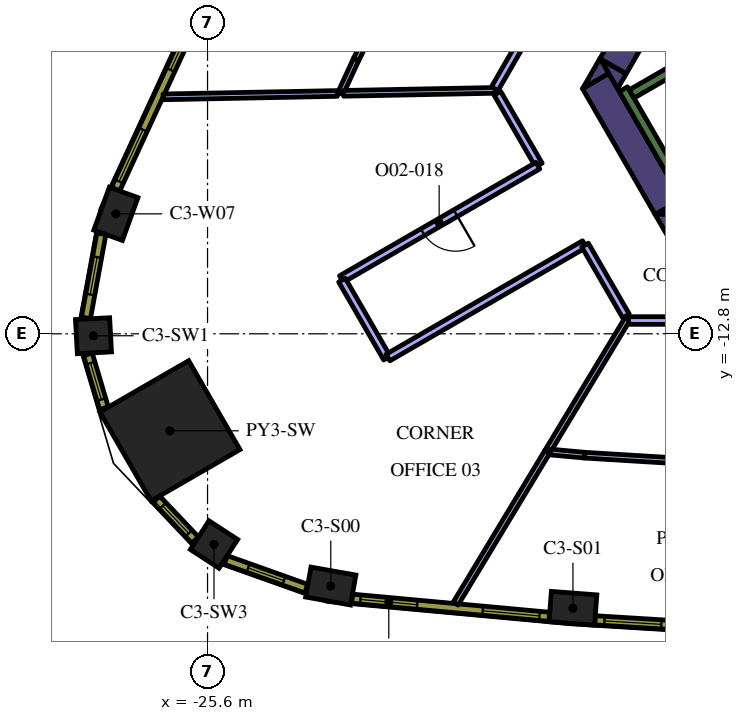
"""IFC4 building model, lengths in metres.
Left out: names, types, materials, properties, quantities, classifications, styles, units other than length and angle.
Written with IfcOpenShell. Run it as: python <this file> out.ifc"""

import sys

from ifc_helpers import new_model, si_unit, direction, frame, frame_2d, origin, origin_2d, place, context, subcontext, project, spatial, polyline, rectangle, outline, extrude, element, fill, save


model = new_model("IFC4")
c1 = context("Model", 3, precision=1e-05, world=origin(), true_north=direction((0.0, 1.0)))
c2 = subcontext(c1, "Body", "Model", "MODEL_VIEW")
j1 = project(units=[si_unit("LENGTHUNIT", "METRE"), si_unit("PLANEANGLEUNIT", "RADIAN")], contexts=[c1])
p1 = place(None, origin())
s1 = spatial("IfcSite", under=j1, at=p1, CompositionType="ELEMENT")
p2 = place(p1, origin())
s2 = spatial("IfcBuilding", under=s1, at=p2, CompositionType="ELEMENT")
p3 = place(p2, frame((0.0, 0.0, 158.4)))
s3 = spatial("IfcBuildingStorey", under=s2, at=p3, CompositionType="ELEMENT", Elevation=158.4)
p4 = place(p3, frame((-26.591, -15.352, 0.0), z_axis=(0.0, 0.0, 1.0), x_axis=(-0.866025403784, -0.5, 0.0)))
e1 = element("IfcColumn", 1, at=p4, inside=s3, PredefinedType="COLUMN", context=c2, shape_type="SweptSolid", body=[
    extrude(rectangle(XDim=2.7, YDim=2.7, at=origin_2d()), origin(), (0.0, 0.0, 1.0), 4.2),
])
for number, where, z_axis, x_axis in (
    (2, (-22.357, -19.437, 0.0), (0.0, 0.0, 1.0), (0.985, -0.175, 0.0)),
    (3, (-15.985, -20.022, 0.0), (0.0, 0.0, 1.0), (0.997, -0.076, 0.0)),
    (4, (-28.012, -9.644, 0.0), (0.0, 0.0, 1.0), (-0.341, -0.94, 0.0)),
):
    element("IfcColumn", number, at=place(p3, frame(where, z_axis=z_axis, x_axis=x_axis)), inside=s3, PredefinedType="COLUMN", context=c2, shape_type="SweptSolid", body=[
        extrude(rectangle(XDim=1.2, YDim=0.8, at=origin_2d()), origin(), (0.0, 0.0, 1.0), 4.2),
    ])
for number, where, z_axis, x_axis in (
    (5, (-28.601, -12.851, 0.0), (0.0, 0.0, 1.0), (0.053, -0.999, 0.0)),
    (6, (-25.43, -18.344, 0.0), (0.0, 0.0, 1.0), (0.838, -0.546, 0.0)),
):
    element("IfcColumn", number, at=place(p3, frame(where, z_axis=z_axis, x_axis=x_axis)), inside=s3, PredefinedType="COLUMN", context=c2, shape_type="SweptSolid", body=[
        extrude(rectangle(XDim=0.9, YDim=0.9, at=origin_2d()), origin(), (0.0, 0.0, 1.0), 4.2),
    ])
p5 = place(p3, origin())
e7 = element("IfcWall", 7, at=p5, inside=s3, PredefinedType="SOLIDWALL", context=c2, shape_type="SweptSolid", body=[
    extrude(outline(polyline([(-13.828, -9.65), (-13.38, -9.65), (-13.38, -10.426), (-13.828, -9.65)])), origin(), (0.0, 0.0, 1.0), 4.2),
])
p6 = place(p3, frame((-15.387, -6.148, 0.0), z_axis=(0.0, 0.0, 1.0), x_axis=(0.499984020225, -0.866034629516, 0.0)))
e8 = element("IfcWall", 8, at=p6, inside=s3, PredefinedType="SOLIDWALL", context=c2, shape_type="SweptSolid", body=[
    extrude(rectangle(XDim=3.824, YDim=0.8, at=frame_2d((1.912, 0.0))), origin(), (0.0, 0.0, 1.0), 4.2),
])
e9 = element("IfcWall", 9, at=p5, inside=s3, PredefinedType="SOLIDWALL", context=c2, shape_type="SweptSolid", body=[
    extrude(outline(polyline([(-15.042, -5.947), (-15.729, -6.343), (-15.271, -5.55), (-15.042, -5.947)])), origin(), (0.0, 0.0, 1.0), 4.2),
])
e10 = element("IfcWall", 10, at=p5, inside=s3, PredefinedType="SOLIDWALL", context=c2, shape_type="SweptSolid", body=[
    extrude(outline(polyline([(-12.904, -9.65), (-13.8, -9.65), (-13.128, -9.262), (-12.904, -9.65)])), origin(), (0.0, 0.0, 1.0), 4.2),
])
p7 = place(p3, frame((-13.518, -3.314, 0.0), z_axis=(0.0, 0.0, 1.0), x_axis=(-0.499969377405, -0.866043083026, 0.0)))
e11 = element("IfcWall", 11, at=p7, inside=s3, PredefinedType="SOLIDWALL", context=c2, shape_type="SweptSolid", body=[
    extrude(rectangle(XDim=2.824, YDim=0.8, at=frame_2d((1.412, 0.0))), origin(), (0.0, 0.0, 1.0), 4.2),
])
e12 = element("IfcWall", 12, at=p5, inside=s3, PredefinedType="SOLIDWALL", context=c2, shape_type="SweptSolid", body=[
    extrude(outline(polyline([(-14.809, -6.35), (-15.257, -5.574), (-14.585, -5.962), (-14.809, -6.35)])), origin(), (0.0, 0.0, 1.0), 4.2),
])
p8 = place(p3, frame((-12.84, -9.511, 0.0), z_axis=(0.0, 0.0, 1.0), x_axis=(-0.499997733992, 0.866026712061, 0.0)))
e13 = element("IfcWall", 13, at=p8, inside=s3, PredefinedType="SOLIDWALL", context=c2, shape_type="SweptSolid", body=[
    extrude(rectangle(XDim=3.634, YDim=0.25, at=frame_2d((1.817, 0.0))), origin(), (0.0, 0.0, 1.0), 4.2),
])
p9 = place(p3, frame((-14.44, -6.49, 0.0), z_axis=(0.0, 0.0, 1.0), x_axis=(0.866022966069, 0.500004222222, 0.0)))
e14 = element("IfcWall", 14, at=p9, inside=s3, PredefinedType="SOLIDWALL", context=c2, shape_type="SweptSolid", body=[
    extrude(rectangle(XDim=6.8, YDim=0.25, at=frame_2d((3.4, 0.0))), origin(), (0.0, 0.0, 1.0), 4.2),
])
p10 = place(p3, frame((-21.689, -5.579, 0.0), z_axis=(0.0, 0.0, 1.0), x_axis=(0.446219729364, 0.894923434225, 0.0)))
e15 = element("IfcWall", 15, at=p10, inside=s3, PredefinedType="PARTITIONING", context=c2, shape_type="SweptSolid", body=[
    extrude(rectangle(XDim=5.995, YDim=0.15, at=frame_2d((2.998, 0.0))), origin(), (0.0, 0.0, 1.0), 3.15),
])
p11 = place(p10, frame((2.595, 0.0, 0.0)))
e16 = element("IfcOpeningElement", 16, at=p11, cuts=e15, PredefinedType="OPENING", context=c2, shape_type="SweptSolid", body=[
    extrude(rectangle(XDim=0.9, YDim=2.1, at=frame_2d((0.45, 1.05))), frame((0.0, 0.085, 0.0), z_axis=(0.0, -1.0, 0.0), x_axis=(1.0, 0.0, 0.0)), (0.0, 0.0, 1.0), 0.17),
])
p12 = place(p3, frame((-21.689, -5.579, 0.0), z_axis=(0.0, 0.0, 1.0), x_axis=(-0.418649696334, -0.908147802816, 0.0)))
e17 = element("IfcWall", 17, at=p12, inside=s3, PredefinedType="PARTITIONING", context=c2, shape_type="SweptSolid", body=[
    extrude(rectangle(XDim=0.986, YDim=0.15, at=frame_2d((0.493, 0.0))), origin(), (0.0, 0.0, 1.0), 3.15),
])
p13 = place(p3, frame((-22.185, -6.476, 0.0), z_axis=(0.0, 0.0, 1.0), x_axis=(-0.999810025733, -0.019491342784, 0.0)))
e18 = element("IfcWall", 18, at=p13, inside=s3, PredefinedType="PARTITIONING", context=c2, shape_type="SweptSolid", body=[
    extrude(rectangle(XDim=4.584, YDim=0.15, at=frame_2d((2.292, 0.0))), origin(), (0.0, 0.0, 1.0), 3.15),
])
p14 = place(p3, frame((-18.016, -6.395, 0.0), z_axis=(0.0, 0.0, 1.0), x_axis=(-0.999809528944, -0.019516808959, 0.0)))
e19 = element("IfcWall", 19, at=p14, inside=s3, PredefinedType="PARTITIONING", context=c2, shape_type="SweptSolid", body=[
    extrude(rectangle(XDim=4.003, YDim=0.15, at=frame_2d((2.001, 0.0))), origin(), (0.0, 0.0, 1.0), 3.15),
])
p15 = place(p3, frame((-13.047, 2.302, 0.0), z_axis=(0.0, 0.0, 1.0), x_axis=(-0.499986873641, -0.866032982159, 0.0)))
e20 = element("IfcWall", 20, at=p15, inside=s3, PredefinedType="PARTITIONING", context=c2, shape_type="SweptSolid", body=[
    extrude(rectangle(XDim=9.99, YDim=0.2, at=frame_2d((4.995, 0.0))), origin(), (0.0, 0.0, 1.0), 3.15),
])
p16 = place(p15, frame((4.5, 0.0, 0.0)))
e21 = element("IfcOpeningElement", 21, at=p16, cuts=e20, PredefinedType="OPENING", context=c2, shape_type="SweptSolid", body=[
    extrude(rectangle(XDim=1.0, YDim=2.1, at=frame_2d((0.5, 1.05))), frame((0.0, 0.11, 0.0), z_axis=(0.0, -1.0, 0.0), x_axis=(1.0, 0.0, 0.0)), (0.0, 0.0, 1.0), 0.22),
])
p17 = place(p3, frame((-16.656, -15.9, 0.0), z_axis=(0.0, 0.0, 1.0), x_axis=(-0.516845255261, -0.856078841062, 0.0)))
e22 = element("IfcWall", 22, at=p17, inside=s3, PredefinedType="PARTITIONING", context=c2, shape_type="SweptSolid", body=[
    extrude(rectangle(XDim=4.672, YDim=0.15, at=frame_2d((2.336, 0.0))), origin(), (0.0, 0.0, 1.0), 3.15),
])
p18 = place(p3, frame((-14.546, -12.406, 0.0), z_axis=(0.0, 0.0, 1.0), x_axis=(-0.516811321583, -0.856099327113, 0.0)))
e23 = element("IfcWall", 23, at=p18, inside=s3, PredefinedType="PARTITIONING", context=c2, shape_type="SweptSolid", body=[
    extrude(rectangle(XDim=4.09, YDim=0.15, at=frame_2d((2.045, 0.0))), origin(), (0.0, 0.0, 1.0), 3.15),
])
p19 = place(p3, frame((-17.974, -6.469, 0.0), z_axis=(0.0, 0.0, 1.0), x_axis=(0.499961062019, -0.866047883471, 0.0)))
e24 = element("IfcWall", 24, at=p19, inside=s3, PredefinedType="PARTITIONING", context=c2, shape_type="SweptSolid", body=[
    extrude(rectangle(XDim=2.185, YDim=0.2, at=frame_2d((1.092, 0.0))), origin(), (0.0, 0.0, 1.0), 3.15),
])
p20 = place(p3, frame((-16.907, -8.376, 0.0), z_axis=(0.0, 0.0, 1.0), x_axis=(-0.866017375886, -0.50001390447, 0.0)))
e25 = element("IfcWall", 25, at=p20, inside=s3, PredefinedType="PARTITIONING", context=c2, shape_type="SweptSolid", body=[
    extrude(rectangle(XDim=5.97, YDim=0.2, at=frame_2d((2.985, 0.0))), origin(), (0.0, 0.0, 1.0), 3.15),
])
p21 = place(p20, frame((2.5, 0.0, 0.0)))
e26 = element("IfcOpeningElement", 26, at=p21, cuts=e25, PredefinedType="OPENING", context=c2, shape_type="SweptSolid", body=[
    extrude(rectangle(XDim=1.0, YDim=2.1, at=frame_2d((0.5, 1.05))), frame((0.0, 0.11, 0.0), z_axis=(0.0, -1.0, 0.0), x_axis=(1.0, 0.0, 0.0)), (0.0, 0.0, 1.0), 0.22),
])
p22 = place(p3, frame((-22.062, -11.387, 0.0), z_axis=(0.0, 0.0, 1.0), x_axis=(0.5000167099, -0.866015756104, 0.0)))
e27 = element("IfcWall", 27, at=p22, inside=s3, PredefinedType="PARTITIONING", context=c2, shape_type="SweptSolid", body=[
    extrude(rectangle(XDim=2.37, YDim=0.2, at=frame_2d((1.185, 0.0))), origin(), (0.0, 0.0, 1.0), 3.15),
])
p23 = place(p3, frame((-20.851, -13.424, 0.0), z_axis=(0.0, 0.0, 1.0), x_axis=(0.866007151214, 0.500031613047, 0.0)))
e28 = element("IfcWall", 28, at=p23, inside=s3, PredefinedType="PARTITIONING", context=c2, shape_type="SweptSolid", body=[
    extrude(rectangle(XDim=5.97, YDim=0.2, at=frame_2d((2.985, 0.0))), origin(), (0.0, 0.0, 1.0), 3.15),
])
p24 = place(p3, frame((-15.666, -10.465, 0.0), z_axis=(0.0, 0.0, 1.0), x_axis=(0.499977443261, -0.866038426532, 0.0)))
e29 = element("IfcWall", 29, at=p24, inside=s3, PredefinedType="PARTITIONING", context=c2, shape_type="SweptSolid", body=[
    extrude(rectangle(XDim=2.155, YDim=0.2, at=frame_2d((1.077, 0.0))), origin(), (0.0, 0.0, 1.0), 3.15),
])
p25 = place(p3, frame((-16.575, -15.911, 0.0), z_axis=(0.0, 0.0, 1.0), x_axis=(0.995808489615, -0.09146284497, 0.0)))
e30 = element("IfcWall", 30, at=p25, inside=s3, PredefinedType="PARTITIONING", context=c2, shape_type="SweptSolid", body=[
    extrude(rectangle(XDim=0.902, YDim=0.15, at=frame_2d((0.451, 0.0))), origin(), (0.0, 0.0, 1.0), 3.15),
])
p26 = place(p3, frame((-9.692, -16.36, 0.0), z_axis=(0.0, 0.0, 1.0), x_axis=(-0.998135339661, 0.061039689709, 0.0)))
e31 = element("IfcWall", 31, at=p26, inside=s3, PredefinedType="PARTITIONING", context=c2, shape_type="SweptSolid", body=[
    extrude(rectangle(XDim=5.996, YDim=0.15, at=frame_2d((2.998, 0.0))), origin(), (0.0, 0.0, 1.0), 3.15),
])
p27 = place(p26, frame((2.595, 0.0, 0.0)))
e32 = element("IfcOpeningElement", 32, at=p27, cuts=e31, PredefinedType="OPENING", context=c2, shape_type="SweptSolid", body=[
    extrude(rectangle(XDim=0.9, YDim=2.1, at=frame_2d((0.45, 1.05))), frame((0.0, 0.085, 0.0), z_axis=(0.0, -1.0, 0.0), x_axis=(1.0, 0.0, 0.0)), (0.0, 0.0, 1.0), 0.17),
])
p28 = place(p3, frame((-14.521, -12.45, 0.0), z_axis=(0.0, 0.0, 1.0), x_axis=(1.0, 0.0, 0.0)))
e33 = element("IfcWall", 33, at=p28, inside=s3, PredefinedType="PARTITIONING", context=c2, shape_type="SweptSolid", body=[
    extrude(rectangle(XDim=9.99, YDim=0.2, at=frame_2d((4.995, 0.0))), origin(), (0.0, 0.0, 1.0), 3.15),
])
p29 = place(p28, frame((4.5, 0.0, 0.0)))
e34 = element("IfcOpeningElement", 34, at=p29, cuts=e33, PredefinedType="OPENING", context=c2, shape_type="SweptSolid", body=[
    extrude(rectangle(XDim=1.0, YDim=2.1, at=frame_2d((0.5, 1.05))), frame((0.0, 0.11, 0.0), z_axis=(0.0, -1.0, 0.0), x_axis=(1.0, 0.0, 0.0)), (0.0, 0.0, 1.0), 0.22),
])
p30 = place(p3, frame((-21.797, -19.77, 0.0), z_axis=(0.0, 0.0, 1.0), x_axis=(0.995808712151, -0.091460422067, 0.0)))
e35 = element("IfcWall", 35, at=p30, inside=s3, PredefinedType="SOLIDWALL", context=c2, shape_type="SweptSolid", body=[
    extrude(rectangle(XDim=5.213, YDim=0.24, at=frame_2d((2.606, 0.0))), origin(), (0.0, 0.0, 1.0), 3.95),
])
p31 = place(p30, frame((0.221, 0.0, 0.9)))
e36 = element("IfcOpeningElement", 36, at=p31, cuts=e35, PredefinedType="OPENING", context=c2, shape_type="SweptSolid", body=[
    extrude(rectangle(XDim=1.5, YDim=2.55, at=frame_2d((0.75, 1.275))), frame((0.0, 0.13, 0.0), z_axis=(0.0, -1.0, 0.0), x_axis=(1.0, 0.0, 0.0)), (0.0, 0.0, 1.0), 0.26),
])
p32 = place(p30, frame((3.452, 0.0, 0.9)))
e37 = element("IfcOpeningElement", 37, at=p32, cuts=e35, PredefinedType="OPENING", context=c2, shape_type="SweptSolid", body=[
    extrude(rectangle(XDim=1.5, YDim=2.55, at=frame_2d((0.75, 1.275))), frame((0.0, 0.13, 0.0), z_axis=(0.0, -1.0, 0.0), x_axis=(1.0, 0.0, 0.0)), (0.0, 0.0, 1.0), 0.26),
])
p33 = place(p3, frame((-15.405, -20.338, 0.0), z_axis=(0.0, 0.0, 1.0), x_axis=(0.998135294646, -0.061040425794, 0.0)))
e38 = element("IfcWall", 38, at=p33, inside=s3, PredefinedType="SOLIDWALL", context=c2, shape_type="SweptSolid", body=[
    extrude(rectangle(XDim=5.204, YDim=0.24, at=frame_2d((2.602, 0.0))), origin(), (0.0, 0.0, 1.0), 3.95),
])
p34 = place(p33, frame((0.248, 0.0, 0.9)))
e39 = element("IfcOpeningElement", 39, at=p34, cuts=e38, PredefinedType="OPENING", context=c2, shape_type="SweptSolid", body=[
    extrude(rectangle(XDim=1.5, YDim=2.55, at=frame_2d((0.75, 1.275))), frame((0.0, 0.13, 0.0), z_axis=(0.0, -1.0, 0.0), x_axis=(1.0, 0.0, 0.0)), (0.0, 0.0, 1.0), 0.26),
])
p35 = place(p33, frame((3.455, 0.0, 0.9)))
e40 = element("IfcOpeningElement", 40, at=p35, cuts=e38, PredefinedType="OPENING", context=c2, shape_type="SweptSolid", body=[
    extrude(rectangle(XDim=1.5, YDim=2.55, at=frame_2d((0.75, 1.275))), frame((0.0, 0.13, 0.0), z_axis=(0.0, -1.0, 0.0), x_axis=(1.0, 0.0, 0.0)), (0.0, 0.0, 1.0), 0.26),
])
p36 = place(p3, frame((-25.837, -4.258, 0.0), z_axis=(0.0, 0.0, 1.0), x_axis=(-0.418722559465, -0.908114209885, 0.0)))
e41 = element("IfcWall", 41, at=p36, inside=s3, PredefinedType="SOLIDWALL", context=c2, shape_type="SweptSolid", body=[
    extrude(rectangle(XDim=5.213, YDim=0.24, at=frame_2d((2.606, 0.0))), origin(), (0.0, 0.0, 1.0), 3.95),
])
p37 = place(p36, frame((0.261, 0.0, 0.9)))
e42 = element("IfcOpeningElement", 42, at=p37, cuts=e41, PredefinedType="OPENING", context=c2, shape_type="SweptSolid", body=[
    extrude(rectangle(XDim=1.5, YDim=2.55, at=frame_2d((0.75, 1.275))), frame((0.0, 0.13, 0.0), z_axis=(0.0, -1.0, 0.0), x_axis=(1.0, 0.0, 0.0)), (0.0, 0.0, 1.0), 0.26),
])
p38 = place(p36, frame((3.492, 0.0, 0.9)))
e43 = element("IfcOpeningElement", 43, at=p38, cuts=e41, PredefinedType="OPENING", context=c2, shape_type="SweptSolid", body=[
    extrude(rectangle(XDim=1.5, YDim=2.55, at=frame_2d((0.75, 1.275))), frame((0.0, 0.13, 0.0), z_axis=(0.0, -1.0, 0.0), x_axis=(1.0, 0.0, 0.0)), (0.0, 0.0, 1.0), 0.26),
])
p39 = place(p3, frame((-28.393, -10.167, 0.0), z_axis=(0.0, 0.0, 1.0), x_axis=(-0.180737189259, -0.983531427265, 0.0)))
e44 = element("IfcWall", 44, at=p39, inside=s3, PredefinedType="SOLIDWALL", context=c2, shape_type="SweptSolid", body=[
    extrude(rectangle(XDim=2.25, YDim=0.24, at=frame_2d((1.125, 0.0))), origin(), (0.0, 0.0, 1.0), 3.95),
])
p40 = place(p39, frame((0.625, 0.0, 0.9)))
e45 = element("IfcOpeningElement", 45, at=p40, cuts=e44, PredefinedType="OPENING", context=c2, shape_type="SweptSolid", body=[
    extrude(rectangle(XDim=1.0, YDim=2.55, at=frame_2d((0.5, 1.275))), frame((0.0, 0.13, 0.0), z_axis=(0.0, -1.0, 0.0), x_axis=(1.0, 0.0, 0.0)), (0.0, 0.0, 1.0), 0.26),
])
p41 = place(p3, frame((-28.748, -13.34, 0.0), z_axis=(0.0, 0.0, 1.0), x_axis=(0.284413721403, -0.958701640281, 0.0)))
e46 = element("IfcWall", 46, at=p41, inside=s3, PredefinedType="SOLIDWALL", context=c2, shape_type="SweptSolid", body=[
    extrude(rectangle(XDim=1.482, YDim=0.24, at=frame_2d((0.741, 0.0))), origin(), (0.0, 0.0, 1.0), 3.95),
])
p42 = place(p41, frame((0.241, 0.0, 0.9)))
e47 = element("IfcOpeningElement", 47, at=p42, cuts=e46, PredefinedType="OPENING", context=c2, shape_type="SweptSolid", body=[
    extrude(rectangle(XDim=1.0, YDim=2.55, at=frame_2d((0.5, 1.275))), frame((0.0, 0.13, 0.0), z_axis=(0.0, -1.0, 0.0), x_axis=(1.0, 0.0, 0.0)), (0.0, 0.0, 1.0), 0.26),
])
p43 = place(p3, frame((-26.946, -17.151, 0.0), z_axis=(0.0, 0.0, 1.0), x_axis=(0.687986858937, -0.725723144133, 0.0)))
e48 = element("IfcWall", 48, at=p43, inside=s3, PredefinedType="SOLIDWALL", context=c2, shape_type="SweptSolid", body=[
    extrude(rectangle(XDim=1.481, YDim=0.24, at=frame_2d((0.741, 0.0))), origin(), (0.0, 0.0, 1.0), 3.95),
])
p44 = place(p43, frame((0.241, 0.0, 0.9)))
e49 = element("IfcOpeningElement", 49, at=p44, cuts=e48, PredefinedType="OPENING", context=c2, shape_type="SweptSolid", body=[
    extrude(rectangle(XDim=1.0, YDim=2.55, at=frame_2d((0.5, 1.275))), frame((0.0, 0.13, 0.0), z_axis=(0.0, -1.0, 0.0), x_axis=(1.0, 0.0, 0.0)), (0.0, 0.0, 1.0), 0.26),
])
p45 = place(p3, frame((-25.121, -18.751, 0.0), z_axis=(0.0, 0.0, 1.0), x_axis=(0.942099727267, -0.335332825539, 0.0)))
e50 = element("IfcWall", 50, at=p45, inside=s3, PredefinedType="SOLIDWALL", context=c2, shape_type="SweptSolid", body=[
    extrude(rectangle(XDim=2.25, YDim=0.24, at=frame_2d((1.125, 0.0))), origin(), (0.0, 0.0, 1.0), 3.95),
])
p46 = place(p45, frame((0.625, 0.0, 0.9)))
e51 = element("IfcOpeningElement", 51, at=p46, cuts=e50, PredefinedType="OPENING", context=c2, shape_type="SweptSolid", body=[
    extrude(rectangle(XDim=1.0, YDim=2.55, at=frame_2d((0.5, 1.275))), frame((0.0, 0.13, 0.0), z_axis=(0.0, -1.0, 0.0), x_axis=(1.0, 0.0, 0.0)), (0.0, 0.0, 1.0), 0.26),
])
p47 = place(p21, origin())
e52 = element("IfcDoor", 52, at=p47, inside=s3, OperationType="SINGLE_SWING_RIGHT", PredefinedType="DOOR", context=c2, shape_type="SweptSolid", body=[
    extrude(rectangle(XDim=1.0, YDim=2.1, at=frame_2d((0.5, 1.05))), frame((0.0, 0.025, 0.0), z_axis=(0.0, -1.0, 0.0), x_axis=(1.0, 0.0, 0.0)), (0.0, 0.0, 1.0), 0.05),
])
fill(e26, e52)
p48 = place(p31, origin())
e53 = element("IfcWindow", 53, at=p48, inside=s3, PartitioningType="SINGLE_PANEL", PredefinedType="WINDOW", context=c2, shape_type="SweptSolid", body=[
    extrude(rectangle(XDim=1.5, YDim=2.55, at=frame_2d((0.75, 1.275))), frame((0.0, 0.04, 0.0), z_axis=(0.0, -1.0, 0.0), x_axis=(1.0, 0.0, 0.0)), (0.0, 0.0, 1.0), 0.06),
])
fill(e36, e53)
p49 = place(p32, origin())
e54 = element("IfcWindow", 54, at=p49, inside=s3, PartitioningType="SINGLE_PANEL", PredefinedType="WINDOW", context=c2, shape_type="SweptSolid", body=[
    extrude(rectangle(XDim=1.5, YDim=2.55, at=frame_2d((0.75, 1.275))), frame((0.0, 0.04, 0.0), z_axis=(0.0, -1.0, 0.0), x_axis=(1.0, 0.0, 0.0)), (0.0, 0.0, 1.0), 0.06),
])
fill(e37, e54)
p50 = place(p34, origin())
e55 = element("IfcWindow", 55, at=p50, inside=s3, PartitioningType="SINGLE_PANEL", PredefinedType="WINDOW", context=c2, shape_type="SweptSolid", body=[
    extrude(rectangle(XDim=1.5, YDim=2.55, at=frame_2d((0.75, 1.275))), frame((0.0, 0.04, 0.0), z_axis=(0.0, -1.0, 0.0), x_axis=(1.0, 0.0, 0.0)), (0.0, 0.0, 1.0), 0.06),
])
fill(e39, e55)
p51 = place(p37, origin())
e56 = element("IfcWindow", 56, at=p51, inside=s3, PartitioningType="SINGLE_PANEL", PredefinedType="WINDOW", context=c2, shape_type="SweptSolid", body=[
    extrude(rectangle(XDim=1.5, YDim=2.55, at=frame_2d((0.75, 1.275))), frame((0.0, 0.04, 0.0), z_axis=(0.0, -1.0, 0.0), x_axis=(1.0, 0.0, 0.0)), (0.0, 0.0, 1.0), 0.06),
])
fill(e42, e56)
p52 = place(p38, origin())
e57 = element("IfcWindow", 57, at=p52, inside=s3, PartitioningType="SINGLE_PANEL", PredefinedType="WINDOW", context=c2, shape_type="SweptSolid", body=[
    extrude(rectangle(XDim=1.5, YDim=2.55, at=frame_2d((0.75, 1.275))), frame((0.0, 0.04, 0.0), z_axis=(0.0, -1.0, 0.0), x_axis=(1.0, 0.0, 0.0)), (0.0, 0.0, 1.0), 0.06),
])
fill(e43, e57)
p53 = place(p40, origin())
e58 = element("IfcWindow", 58, at=p53, inside=s3, PartitioningType="SINGLE_PANEL", PredefinedType="WINDOW", context=c2, shape_type="SweptSolid", body=[
    extrude(rectangle(XDim=1.0, YDim=2.55, at=frame_2d((0.5, 1.275))), frame((0.0, 0.04, 0.0), z_axis=(0.0, -1.0, 0.0), x_axis=(1.0, 0.0, 0.0)), (0.0, 0.0, 1.0), 0.06),
])
fill(e45, e58)
p54 = place(p42, origin())
e59 = element("IfcWindow", 59, at=p54, inside=s3, PartitioningType="SINGLE_PANEL", PredefinedType="WINDOW", context=c2, shape_type="SweptSolid", body=[
    extrude(rectangle(XDim=1.0, YDim=2.55, at=frame_2d((0.5, 1.275))), frame((0.0, 0.04, 0.0), z_axis=(0.0, -1.0, 0.0), x_axis=(1.0, 0.0, 0.0)), (0.0, 0.0, 1.0), 0.06),
])
fill(e47, e59)
p55 = place(p44, origin())
e60 = element("IfcWindow", 60, at=p55, inside=s3, PartitioningType="SINGLE_PANEL", PredefinedType="WINDOW", context=c2, shape_type="SweptSolid", body=[
    extrude(rectangle(XDim=1.0, YDim=2.55, at=frame_2d((0.5, 1.275))), frame((0.0, 0.04, 0.0), z_axis=(0.0, -1.0, 0.0), x_axis=(1.0, 0.0, 0.0)), (0.0, 0.0, 1.0), 0.06),
])
fill(e49, e60)
p56 = place(p46, origin())
e61 = element("IfcWindow", 61, at=p56, inside=s3, PartitioningType="SINGLE_PANEL", PredefinedType="WINDOW", context=c2, shape_type="SweptSolid", body=[
    extrude(rectangle(XDim=1.0, YDim=2.55, at=frame_2d((0.5, 1.275))), frame((0.0, 0.04, 0.0), z_axis=(0.0, -1.0, 0.0), x_axis=(1.0, 0.0, 0.0)), (0.0, 0.0, 1.0), 0.06),
])
fill(e51, e61)
save(model, sys.argv[1])
